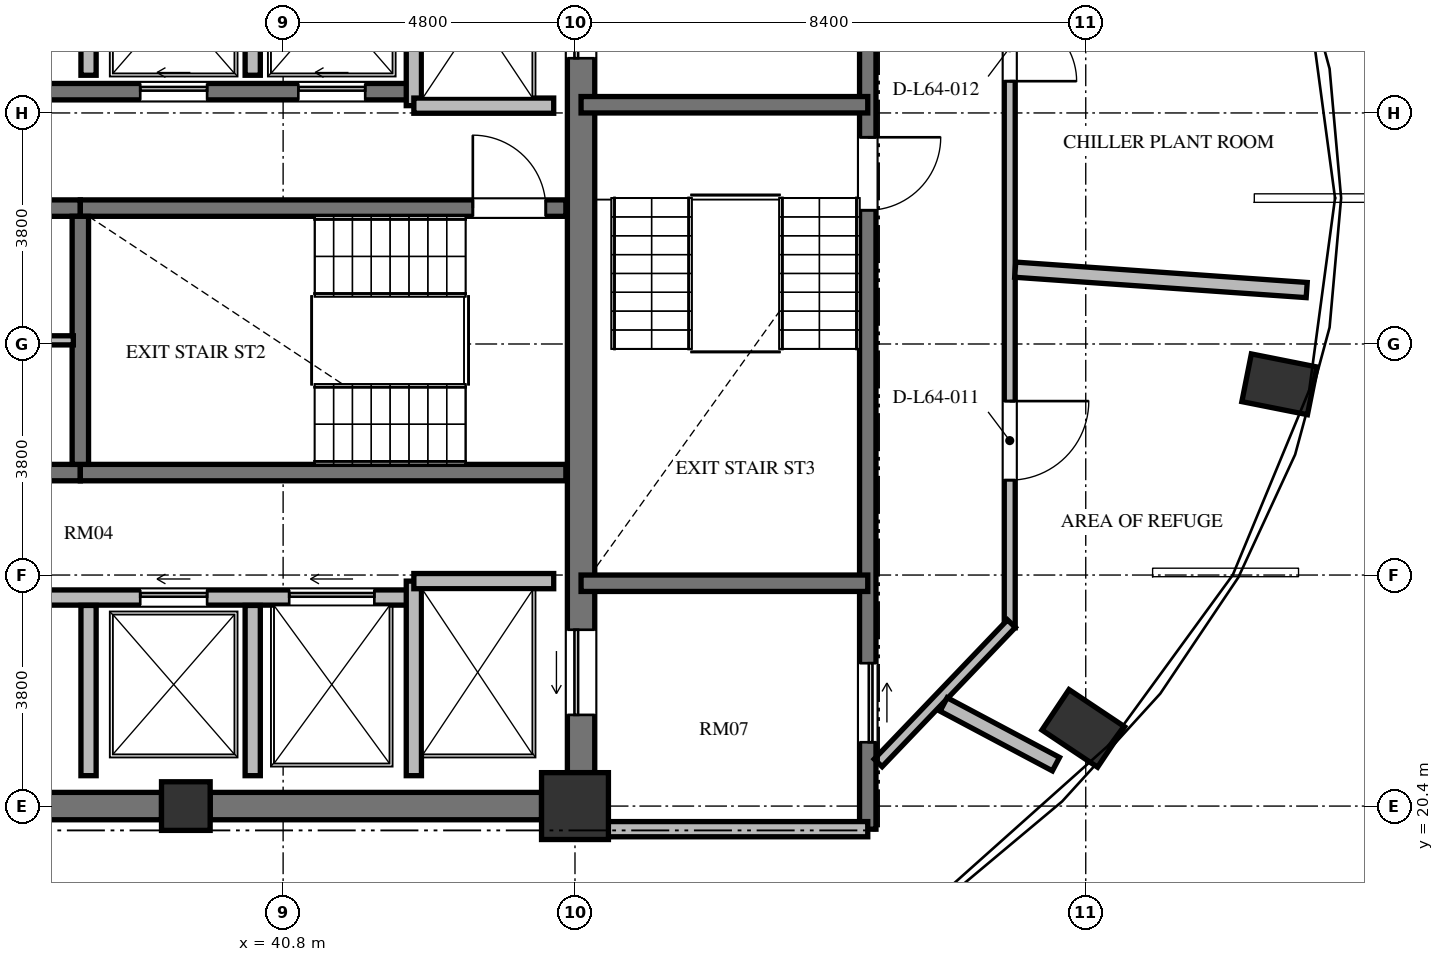
"""IFC4 building model, lengths in metres.
Left out: names, types, materials, properties, quantities, classifications, styles, units other than length and angle.
Written with IfcOpenShell. Run it as: python <this file> out.ifc"""

import sys

from ifc_helpers import new_model, si_unit, direction, frame, frame_2d, origin, origin_2d, place, context, subcontext, project, spatial, rectangle, extrude, element, fill, save


model = new_model("IFC4")
c1 = context("Model", 3, precision=1e-05, world=origin(), true_north=direction((0.0, 1.0)))
c2 = subcontext(c1, "Body", "Model", "MODEL_VIEW")
j1 = project(units=[si_unit("LENGTHUNIT", "METRE"), si_unit("PLANEANGLEUNIT", "RADIAN")], contexts=[c1])
p1 = place(None, origin())
s1 = spatial("IfcSite", under=j1, at=p1, CompositionType="ELEMENT")
p2 = place(p1, origin())
s2 = spatial("IfcBuilding", under=s1, at=p2, CompositionType="ELEMENT")
p3 = place(p2, frame((0.0, 0.0, 245.904)))
s3 = spatial("IfcBuildingStorey", under=s2, at=p3, CompositionType="ELEMENT", Elevation=245.904)
for number, where, z_axis, x_axis in (
    (1, (53.96, 21.677, 0.0), (0.0, 0.0, 1.0), (0.831, -0.556, 0.0)),
    (2, (57.185, 27.337, 0.0), (0.0, 0.0, 1.0), (0.981, -0.195, 0.0)),
):
    element("IfcColumn", number, at=place(p3, frame(where, z_axis=z_axis, x_axis=x_axis)), inside=s3, PredefinedType="COLUMN", context=c2, shape_type="SweptSolid", body=[
        extrude(rectangle(XDim=1.1, YDim=0.8, at=origin_2d()), origin(), (0.0, 0.0, 1.0), 5.472),
    ])
p4 = place(p3, frame((39.2, 20.4, 0.0), z_axis=(0.0, 0.0, 1.0), x_axis=(1.0, 0.0, 0.0)))
e3 = element("IfcColumn", 3, at=p4, inside=s3, PredefinedType="COLUMN", context=c2, shape_type="SweptSolid", body=[
    extrude(rectangle(XDim=0.8, YDim=0.8, at=origin_2d()), origin(), (0.0, 0.0, 1.0), 5.472),
])
p5 = place(p3, frame((45.6, 20.4, 0.0), z_axis=(0.0, 0.0, 1.0), x_axis=(1.0, 0.0, 0.0)))
e4 = element("IfcColumn", 4, at=p5, inside=s3, PredefinedType="COLUMN", context=c2, shape_type="SweptSolid", body=[
    extrude(rectangle(XDim=1.1, YDim=1.1, at=origin_2d()), origin(), (0.0, 0.0, 1.0), 5.472),
])
p6 = place(p3, frame((45.7, 20.95, 0.0), z_axis=(0.0, 0.0, 1.0), x_axis=(0.0, 1.0, 0.0)))
e5 = element("IfcWall", 5, at=p6, inside=s3, PredefinedType="SHEAR", context=c2, shape_type="SweptSolid", body=[
    extrude(rectangle(XDim=14.1, YDim=0.45, at=frame_2d((7.05, 0.0))), origin(), (0.0, 0.0, 1.0), 5.472),
])
p7 = place(p6, frame((11.75, 0.0, 0.0)))
e6 = element("IfcOpeningElement", 6, at=p7, cuts=e5, PredefinedType="OPENING", context=c2, shape_type="SweptSolid", body=[
    extrude(rectangle(XDim=1.4, YDim=2.3, at=frame_2d((0.7, 1.15))), frame((0.0, 0.235, 0.0), z_axis=(0.0, -1.0, 0.0), x_axis=(1.0, 0.0, 0.0)), (0.0, 0.0, 1.0), 0.47),
])
p8 = place(p6, frame((0.95, 0.0, 0.0)))
e7 = element("IfcOpeningElement", 7, at=p8, cuts=e5, PredefinedType="OPENING", context=c2, shape_type="SweptSolid", body=[
    extrude(rectangle(XDim=1.4, YDim=2.3, at=frame_2d((0.7, 1.15))), frame((0.0, 0.235, 0.0), z_axis=(0.0, -1.0, 0.0), x_axis=(1.0, 0.0, 0.0)), (0.0, 0.0, 1.0), 0.47),
])
p9 = place(p3, frame((33.2, 20.4, 0.0), z_axis=(0.0, 0.0, 1.0), x_axis=(1.0, 0.0, 0.0)))
e8 = element("IfcWall", 8, at=p9, inside=s3, PredefinedType="SHEAR", context=c2, shape_type="SweptSolid", body=[
    extrude(rectangle(XDim=5.6, YDim=0.45, at=frame_2d((2.8, 0.0))), origin(), (0.0, 0.0, 1.0), 5.472),
])
p10 = place(p3, frame((39.6, 20.4, 0.0), z_axis=(0.0, 0.0, 1.0), x_axis=(1.0, 0.0, 0.0)))
e9 = element("IfcWall", 9, at=p10, inside=s3, PredefinedType="SHEAR", context=c2, shape_type="SweptSolid", body=[
    extrude(rectangle(XDim=5.45, YDim=0.45, at=frame_2d((2.725, 0.0))), origin(), (0.0, 0.0, 1.0), 5.472),
])
p11 = place(p3, frame((34.535, 30.235, 0.0), z_axis=(0.0, 0.0, 1.0), x_axis=(1.0, 0.0, 0.0)))
e10 = element("IfcWall", 10, at=p11, inside=s3, PredefinedType="SHEAR", context=c2, shape_type="SweptSolid", body=[
    extrude(rectangle(XDim=2.93, YDim=0.27, at=frame_2d((1.465, 0.0))), origin(), (0.0, 0.0, 1.0), 5.472),
])
p12 = place(p11, frame((0.915, 0.0, 0.0)))
e11 = element("IfcOpeningElement", 11, at=p12, cuts=e10, PredefinedType="OPENING", context=c2, shape_type="SweptSolid", body=[
    extrude(rectangle(XDim=1.1, YDim=2.15, at=frame_2d((0.55, 1.075))), frame((0.0, 0.145, 0.0), z_axis=(0.0, -1.0, 0.0), x_axis=(1.0, 0.0, 0.0)), (0.0, 0.0, 1.0), 0.29),
])
p13 = place(p3, frame((37.465, 30.235, 0.0), z_axis=(0.0, 0.0, 1.0), x_axis=(1.0, 0.0, 0.0)))
e12 = element("IfcWall", 12, at=p13, inside=s3, PredefinedType="SHEAR", context=c2, shape_type="SweptSolid", body=[
    extrude(rectangle(XDim=7.985, YDim=0.27, at=frame_2d((3.992, 0.0))), origin(), (0.0, 0.0, 1.0), 5.472),
])
p14 = place(p13, frame((6.455, 0.0, 0.0)))
e13 = element("IfcOpeningElement", 13, at=p14, cuts=e12, PredefinedType="OPENING", context=c2, shape_type="SweptSolid", body=[
    extrude(rectangle(XDim=1.2, YDim=2.15, at=frame_2d((0.6, 1.075))), frame((0.0, 0.145, 0.0), z_axis=(0.0, -1.0, 0.0), x_axis=(1.0, 0.0, 0.0)), (0.0, 0.0, 1.0), 0.29),
])
p15 = place(p3, frame((34.535, 25.885, 0.0), z_axis=(0.0, 0.0, 1.0), x_axis=(1.0, 0.0, 0.0)))
e14 = element("IfcWall", 14, at=p15, inside=s3, PredefinedType="SHEAR", context=c2, shape_type="SweptSolid", body=[
    extrude(rectangle(XDim=2.93, YDim=0.27, at=frame_2d((1.465, 0.0))), origin(), (0.0, 0.0, 1.0), 5.472),
])
p16 = place(p15, frame((0.94, 0.0, 0.0)))
e15 = element("IfcOpeningElement", 15, at=p16, cuts=e14, PredefinedType="OPENING", context=c2, shape_type="SweptSolid", body=[
    extrude(rectangle(XDim=1.05, YDim=2.15, at=frame_2d((0.525, 1.075))), frame((0.0, 0.145, 0.0), z_axis=(0.0, -1.0, 0.0), x_axis=(1.0, 0.0, 0.0)), (0.0, 0.0, 1.0), 0.29),
])
p17 = place(p3, frame((37.465, 25.885, 0.0), z_axis=(0.0, 0.0, 1.0), x_axis=(1.0, 0.0, 0.0)))
e16 = element("IfcWall", 16, at=p17, inside=s3, PredefinedType="SHEAR", context=c2, shape_type="SweptSolid", body=[
    extrude(rectangle(XDim=7.985, YDim=0.27, at=frame_2d((3.992, 0.0))), origin(), (0.0, 0.0, 1.0), 5.472),
])
p18 = place(p3, frame((37.465, 26.02, 0.0), z_axis=(0.0, 0.0, 1.0), x_axis=(0.0, 1.0, 0.0)))
e17 = element("IfcWall", 17, at=p18, inside=s3, PredefinedType="SHEAR", context=c2, shape_type="SweptSolid", body=[
    extrude(rectangle(XDim=4.08, YDim=0.27, at=frame_2d((2.04, 0.0))), origin(), (0.0, 0.0, 1.0), 5.472),
])
p19 = place(p3, frame((34.65, 28.06, 0.0), z_axis=(0.0, 0.0, 1.0), x_axis=(1.0, 0.0, 0.0)))
e18 = element("IfcWall", 18, at=p19, inside=s3, PredefinedType="PARTITIONING", context=c2, shape_type="SweptSolid", body=[
    extrude(rectangle(XDim=2.7, YDim=0.15, at=frame_2d((1.35, 0.0))), origin(), (0.0, 0.0, 1.0), 5.272),
])
p20 = place(p3, frame((26.55, 32.15, 0.0), z_axis=(0.0, 0.0, 1.0), x_axis=(1.0, 0.0, 0.0)))
e19 = element("IfcWall", 19, at=p20, inside=s3, PredefinedType="SHEAR", context=c2, shape_type="SweptSolid", body=[
    extrude(rectangle(XDim=16.4, YDim=0.27, at=frame_2d((8.2, 0.0))), origin(), (0.0, 0.0, 1.0), 5.472),
])
p21 = place(p20, frame((2.175, 0.0, 0.0)))
e20 = element("IfcOpeningElement", 20, at=p21, cuts=e19, PredefinedType="OPENING", context=c2, shape_type="SweptSolid", body=[
    extrude(rectangle(XDim=1.05, YDim=2.15, at=frame_2d((0.525, 1.075))), frame((0.0, 0.145, 0.0), z_axis=(0.0, -1.0, 0.0), x_axis=(1.0, 0.0, 0.0)), (0.0, 0.0, 1.0), 0.29),
])
p22 = place(p20, frame((7.575, 0.0, 0.0)))
e21 = element("IfcOpeningElement", 21, at=p22, cuts=e19, PredefinedType="OPENING", context=c2, shape_type="SweptSolid", body=[
    extrude(rectangle(XDim=1.05, YDim=2.15, at=frame_2d((0.525, 1.075))), frame((0.0, 0.145, 0.0), z_axis=(0.0, -1.0, 0.0), x_axis=(1.0, 0.0, 0.0)), (0.0, 0.0, 1.0), 0.29),
])
p23 = place(p20, frame((11.9, 0.0, 0.0)))
e22 = element("IfcOpeningElement", 22, at=p23, cuts=e19, PredefinedType="OPENING", context=c2, shape_type="SweptSolid", body=[
    extrude(rectangle(XDim=1.1, YDim=2.2, at=frame_2d((0.55, 1.1))), frame((0.0, 0.145, 0.0), z_axis=(0.0, -1.0, 0.0), x_axis=(1.0, 0.0, 0.0)), (0.0, 0.0, 1.0), 0.29),
])
p24 = place(p20, frame((14.5, 0.0, 0.0)))
e23 = element("IfcOpeningElement", 23, at=p24, cuts=e19, PredefinedType="OPENING", context=c2, shape_type="SweptSolid", body=[
    extrude(rectangle(XDim=1.1, YDim=2.2, at=frame_2d((0.55, 1.1))), frame((0.0, 0.145, 0.0), z_axis=(0.0, -1.0, 0.0), x_axis=(1.0, 0.0, 0.0)), (0.0, 0.0, 1.0), 0.29),
])
p25 = place(p3, frame((26.75, 23.83, 0.0), z_axis=(0.0, 0.0, 1.0), x_axis=(1.0, 0.0, 0.0)))
e24 = element("IfcWall", 24, at=p25, inside=s3, PredefinedType="SOLIDWALL", context=c2, shape_type="SweptSolid", body=[
    extrude(rectangle(XDim=16.2, YDim=0.25, at=frame_2d((8.1, 0.0))), origin(), (0.0, 0.0, 1.0), 5.272),
])
p26 = place(p25, frame((4.75, 0.0, 0.0)))
e25 = element("IfcOpeningElement", 25, at=p26, cuts=e24, PredefinedType="OPENING", context=c2, shape_type="SweptSolid", body=[
    extrude(rectangle(XDim=1.4, YDim=2.2, at=frame_2d((0.7, 1.1))), frame((0.0, 0.135, 0.0), z_axis=(0.0, -1.0, 0.0), x_axis=(1.0, 0.0, 0.0)), (0.0, 0.0, 1.0), 0.27),
])
p27 = place(p25, frame((11.7, 0.0, 0.0)))
e26 = element("IfcOpeningElement", 26, at=p27, cuts=e24, PredefinedType="OPENING", context=c2, shape_type="SweptSolid", body=[
    extrude(rectangle(XDim=1.1, YDim=2.2, at=frame_2d((0.55, 1.1))), frame((0.0, 0.135, 0.0), z_axis=(0.0, -1.0, 0.0), x_axis=(1.0, 0.0, 0.0)), (0.0, 0.0, 1.0), 0.27),
])
p28 = place(p25, frame((14.15, 0.0, 0.0)))
e27 = element("IfcOpeningElement", 27, at=p28, cuts=e24, PredefinedType="OPENING", context=c2, shape_type="SweptSolid", body=[
    extrude(rectangle(XDim=1.4, YDim=2.3, at=frame_2d((0.7, 1.15))), frame((0.0, 0.135, 0.0), z_axis=(0.0, -1.0, 0.0), x_axis=(1.0, 0.0, 0.0)), (0.0, 0.0, 1.0), 0.27),
])
p29 = place(p3, frame((42.95, 31.92, 0.0), z_axis=(0.0, 0.0, 1.0), x_axis=(0.0, 1.0, 0.0)))
e28 = element("IfcWall", 28, at=p29, inside=s3, PredefinedType="SOLIDWALL", context=c2, shape_type="SweptSolid", body=[
    extrude(rectangle(XDim=3.18, YDim=0.25, at=frame_2d((1.59, 0.0))), origin(), (0.0, 0.0, 1.0), 5.272),
])
p30 = place(p3, frame((42.95, 31.92, 0.0), z_axis=(0.0, 0.0, 1.0), x_axis=(1.0, 0.0, 0.0)))
e29 = element("IfcWall", 29, at=p30, inside=s3, PredefinedType="SOLIDWALL", context=c2, shape_type="SweptSolid", body=[
    extrude(rectangle(XDim=2.3, YDim=0.25, at=frame_2d((1.15, 0.0))), origin(), (0.0, 0.0, 1.0), 5.272),
])
p31 = place(p3, frame((42.95, 20.9, 0.0), z_axis=(0.0, 0.0, 1.0), x_axis=(0.0, 1.0, 0.0)))
e30 = element("IfcWall", 30, at=p31, inside=s3, PredefinedType="SOLIDWALL", context=c2, shape_type="SweptSolid", body=[
    extrude(rectangle(XDim=3.2, YDim=0.25, at=frame_2d((1.6, 0.0))), origin(), (0.0, 0.0, 1.0), 5.272),
])
p32 = place(p3, frame((42.95, 24.1, 0.0), z_axis=(0.0, 0.0, 1.0), x_axis=(1.0, 0.0, 0.0)))
e31 = element("IfcWall", 31, at=p32, inside=s3, PredefinedType="SOLIDWALL", context=c2, shape_type="SweptSolid", body=[
    extrude(rectangle(XDim=2.3, YDim=0.25, at=frame_2d((1.15, 0.0))), origin(), (0.0, 0.0, 1.0), 5.272),
])
p33 = place(p3, frame((37.6, 32.42, 0.0), z_axis=(0.0, 0.0, 1.0), x_axis=(0.0, 1.0, 0.0)))
e32 = element("IfcWall", 32, at=p33, inside=s3, PredefinedType="SOLIDWALL", context=c2, shape_type="SweptSolid", body=[
    extrude(rectangle(XDim=2.68, YDim=0.25, at=frame_2d((1.34, 0.0))), origin(), (0.0, 0.0, 1.0), 5.272),
])
p34 = place(p3, frame((37.6, 20.9, 0.0), z_axis=(0.0, 0.0, 1.0), x_axis=(0.0, 1.0, 0.0)))
e33 = element("IfcWall", 33, at=p34, inside=s3, PredefinedType="SOLIDWALL", context=c2, shape_type="SweptSolid", body=[
    extrude(rectangle(XDim=2.8, YDim=0.25, at=frame_2d((1.4, 0.0))), origin(), (0.0, 0.0, 1.0), 5.272),
])
p35 = place(p3, frame((40.3, 32.42, 0.0), z_axis=(0.0, 0.0, 1.0), x_axis=(0.0, 1.0, 0.0)))
e34 = element("IfcWall", 34, at=p35, inside=s3, PredefinedType="SOLIDWALL", context=c2, shape_type="SweptSolid", body=[
    extrude(rectangle(XDim=2.68, YDim=0.25, at=frame_2d((1.34, 0.0))), origin(), (0.0, 0.0, 1.0), 5.272),
])
p36 = place(p3, frame((40.3, 20.9, 0.0), z_axis=(0.0, 0.0, 1.0), x_axis=(0.0, 1.0, 0.0)))
e35 = element("IfcWall", 35, at=p36, inside=s3, PredefinedType="SOLIDWALL", context=c2, shape_type="SweptSolid", body=[
    extrude(rectangle(XDim=2.8, YDim=0.25, at=frame_2d((1.4, 0.0))), origin(), (0.0, 0.0, 1.0), 5.272),
])
p37 = place(p3, frame((50.415, 35.845, 0.0), z_axis=(0.0, 0.0, 1.0), x_axis=(0.0, -1.0, 0.0)))
e36 = element("IfcWall", 36, at=p37, inside=s3, PredefinedType="SHEAR", context=c2, shape_type="SweptSolid", body=[
    extrude(rectangle(XDim=15.825, YDim=0.27, at=frame_2d((7.913, 0.0))), origin(), (0.0, 0.0, 1.0), 5.472),
])
p38 = place(p37, frame((4.445, 0.0, 0.0)))
e37 = element("IfcOpeningElement", 37, at=p38, cuts=e36, PredefinedType="OPENING", context=c2, shape_type="SweptSolid", body=[
    extrude(rectangle(XDim=1.2, YDim=2.15, at=frame_2d((0.6, 1.075))), frame((0.0, 0.145, 0.0), z_axis=(0.0, -1.0, 0.0), x_axis=(1.0, 0.0, 0.0)), (0.0, 0.0, 1.0), 0.29),
])
p39 = place(p37, frame((1.295, 0.0, 0.0)))
e38 = element("IfcOpeningElement", 38, at=p39, cuts=e36, PredefinedType="OPENING", context=c2, shape_type="SweptSolid", body=[
    extrude(rectangle(XDim=1.3, YDim=2.2, at=frame_2d((0.65, 1.1))), frame((0.0, 0.145, 0.0), z_axis=(0.0, -1.0, 0.0), x_axis=(1.0, 0.0, 0.0)), (0.0, 0.0, 1.0), 0.29),
])
p40 = place(p37, frame((13.095, 0.0, 0.0)))
e39 = element("IfcOpeningElement", 39, at=p40, cuts=e36, PredefinedType="OPENING", context=c2, shape_type="SweptSolid", body=[
    extrude(rectangle(XDim=1.3, YDim=2.2, at=frame_2d((0.65, 1.1))), frame((0.0, 0.145, 0.0), z_axis=(0.0, -1.0, 0.0), x_axis=(1.0, 0.0, 0.0)), (0.0, 0.0, 1.0), 0.29),
])
for number, where, z_axis, x_axis in (
    (40, (45.7, 31.935, 0.0), (0.0, 0.0, 1.0), (1.0, 0.0, 0.0)),
    (41, (45.7, 24.065, 0.0), (0.0, 0.0, 1.0), (1.0, 0.0, 0.0)),
):
    element("IfcWall", number, at=place(p3, frame(where, z_axis=z_axis, x_axis=x_axis)), inside=s3, PredefinedType="SHEAR", context=c2, shape_type="SweptSolid", body=[
        extrude(rectangle(XDim=4.715, YDim=0.27, at=frame_2d((2.357, 0.0))), origin(), (0.0, 0.0, 1.0), 5.472),
    ])
p41 = place(p3, frame((45.7, 20.02, 0.0), z_axis=(0.0, 0.0, 1.0), x_axis=(1.0, 0.0, 0.0)))
e42 = element("IfcWall", 42, at=p41, inside=s3, PredefinedType="SOLIDWALL", context=c2, shape_type="SweptSolid", body=[
    extrude(rectangle(XDim=4.715, YDim=0.25, at=frame_2d((2.357, 0.0))), origin(), (0.0, 0.0, 1.0), 5.272),
])
p42 = place(p3, frame((52.75, 37.468, 0.0), z_axis=(0.0, 0.0, 1.0), x_axis=(0.0, -1.0, 0.0)))
e43 = element("IfcWall", 43, at=p42, inside=s3, PredefinedType="PARTITIONING", context=c2, shape_type="SweptSolid", body=[
    extrude(rectangle(XDim=14.136, YDim=0.18, at=frame_2d((7.068, 0.0))), origin(), (0.0, 0.0, 1.0), 5.272),
])
p43 = place(p42, frame((10.407, 0.0, 0.0)))
e44 = element("IfcOpeningElement", 44, at=p43, cuts=e43, PredefinedType="OPENING", context=c2, shape_type="SweptSolid", body=[
    extrude(rectangle(XDim=1.3, YDim=2.2, at=frame_2d((0.65, 1.1))), frame((0.0, 0.1, 0.0), z_axis=(0.0, -1.0, 0.0), x_axis=(1.0, 0.0, 0.0)), (0.0, 0.0, 1.0), 0.2),
])
p44 = place(p42, frame((4.046, 0.0, 0.0)))
e45 = element("IfcOpeningElement", 45, at=p44, cuts=e43, PredefinedType="OPENING", context=c2, shape_type="SweptSolid", body=[
    extrude(rectangle(XDim=1.1, YDim=2.15, at=frame_2d((0.55, 1.075))), frame((0.0, 0.1, 0.0), z_axis=(0.0, -1.0, 0.0), x_axis=(1.0, 0.0, 0.0)), (0.0, 0.0, 1.0), 0.2),
])
p45 = place(p3, frame((52.778, 23.401, 0.0), z_axis=(0.0, 0.0, 1.0), x_axis=(-0.691338054195, -0.72253144902, 0.0)))
e46 = element("IfcWall", 46, at=p45, inside=s3, PredefinedType="PARTITIONING", context=c2, shape_type="SweptSolid", body=[
    extrude(rectangle(XDim=3.17, YDim=0.18, at=frame_2d((1.585, 0.0))), origin(), (0.0, 0.0, 1.0), 5.272),
])
p46 = place(p3, frame((51.662, 22.072, 0.0), z_axis=(0.0, 0.0, 1.0), x_axis=(0.882994838887, -0.469382695143, 0.0)))
e47 = element("IfcWall", 47, at=p46, inside=s3, PredefinedType="SOLIDWALL", context=c2, shape_type="SweptSolid", body=[
    extrude(rectangle(XDim=2.093, YDim=0.25, at=frame_2d((1.046, 0.0))), origin(), (0.0, 0.0, 1.0), 5.272),
])
p47 = place(p3, frame((52.84, 29.222, 0.0), z_axis=(0.0, 0.0, 1.0), x_axis=(0.997564343245, -0.069752283728, 0.0)))
e48 = element("IfcWall", 48, at=p47, inside=s3, PredefinedType="SOLIDWALL", context=c2, shape_type="SweptSolid", body=[
    extrude(rectangle(XDim=4.806, YDim=0.25, at=frame_2d((2.403, 0.0))), origin(), (0.0, 0.0, 1.0), 5.272),
])
p48 = place(p14, origin())
e49 = element("IfcDoor", 49, at=p48, inside=s3, OperationType="SINGLE_SWING_LEFT", PredefinedType="DOOR", context=c2, shape_type="SweptSolid", body=[
    extrude(rectangle(XDim=1.2, YDim=2.15, at=frame_2d((0.6, 1.075))), frame((0.0, 0.025, 0.0), z_axis=(0.0, -1.0, 0.0), x_axis=(1.0, 0.0, 0.0)), (0.0, 0.0, 1.0), 0.05),
])
fill(e13, e49)
p49 = place(p23, origin())
e50 = element("IfcDoor", 50, at=p49, inside=s3, OperationType="SLIDING_TO_LEFT", PredefinedType="DOOR", context=c2, shape_type="SweptSolid", body=[
    extrude(rectangle(XDim=1.1, YDim=2.2, at=frame_2d((0.55, 1.1))), frame((0.0, 0.025, 0.0), z_axis=(0.0, -1.0, 0.0), x_axis=(1.0, 0.0, 0.0)), (0.0, 0.0, 1.0), 0.05),
])
fill(e22, e50)
p50 = place(p24, origin())
e51 = element("IfcDoor", 51, at=p50, inside=s3, OperationType="SLIDING_TO_LEFT", PredefinedType="DOOR", context=c2, shape_type="SweptSolid", body=[
    extrude(rectangle(XDim=1.1, YDim=2.2, at=frame_2d((0.55, 1.1))), frame((0.0, 0.025, 0.0), z_axis=(0.0, -1.0, 0.0), x_axis=(1.0, 0.0, 0.0)), (0.0, 0.0, 1.0), 0.05),
])
fill(e23, e51)
p51 = place(p27, origin())
e52 = element("IfcDoor", 52, at=p51, inside=s3, OperationType="SLIDING_TO_LEFT", PredefinedType="DOOR", context=c2, shape_type="SweptSolid", body=[
    extrude(rectangle(XDim=1.1, YDim=2.2, at=frame_2d((0.55, 1.1))), frame((0.0, 0.025, 0.0), z_axis=(0.0, -1.0, 0.0), x_axis=(1.0, 0.0, 0.0)), (0.0, 0.0, 1.0), 0.05),
])
fill(e26, e52)
p52 = place(p7, origin())
e53 = element("IfcDoor", 53, at=p52, inside=s3, OperationType="SLIDING_TO_LEFT", PredefinedType="DOOR", context=c2, shape_type="SweptSolid", body=[
    extrude(rectangle(XDim=1.4, YDim=2.3, at=frame_2d((0.7, 1.15))), frame((0.0, 0.025, 0.0), z_axis=(0.0, -1.0, 0.0), x_axis=(1.0, 0.0, 0.0)), (0.0, 0.0, 1.0), 0.05),
])
fill(e6, e53)
p53 = place(p8, origin())
e54 = element("IfcDoor", 54, at=p53, inside=s3, OperationType="SLIDING_TO_LEFT", PredefinedType="DOOR", context=c2, shape_type="SweptSolid", body=[
    extrude(rectangle(XDim=1.4, YDim=2.3, at=frame_2d((0.7, 1.15))), frame((0.0, 0.025, 0.0), z_axis=(0.0, -1.0, 0.0), x_axis=(1.0, 0.0, 0.0)), (0.0, 0.0, 1.0), 0.05),
])
fill(e7, e54)
p54 = place(p28, origin())
e55 = element("IfcDoor", 55, at=p54, inside=s3, OperationType="SLIDING_TO_LEFT", PredefinedType="DOOR", context=c2, shape_type="SweptSolid", body=[
    extrude(rectangle(XDim=1.4, YDim=2.3, at=frame_2d((0.7, 1.15))), frame((0.0, 0.025, 0.0), z_axis=(0.0, -1.0, 0.0), x_axis=(1.0, 0.0, 0.0)), (0.0, 0.0, 1.0), 0.05),
])
fill(e27, e55)
p55 = place(p38, origin())
e56 = element("IfcDoor", 56, at=p55, inside=s3, OperationType="SINGLE_SWING_LEFT", PredefinedType="DOOR", context=c2, shape_type="SweptSolid", body=[
    extrude(rectangle(XDim=1.2, YDim=2.15, at=frame_2d((0.6, 1.075))), frame((0.0, 0.025, 0.0), z_axis=(0.0, -1.0, 0.0), x_axis=(1.0, 0.0, 0.0)), (0.0, 0.0, 1.0), 0.05),
])
fill(e37, e56)
p56 = place(p40, origin())
e57 = element("IfcDoor", 57, at=p56, inside=s3, OperationType="SLIDING_TO_LEFT", PredefinedType="DOOR", context=c2, shape_type="SweptSolid", body=[
    extrude(rectangle(XDim=1.3, YDim=2.2, at=frame_2d((0.65, 1.1))), frame((0.0, 0.025, 0.0), z_axis=(0.0, -1.0, 0.0), x_axis=(1.0, 0.0, 0.0)), (0.0, 0.0, 1.0), 0.05),
])
fill(e39, e57)
p57 = place(p43, origin())
e58 = element("IfcDoor", 58, at=p57, inside=s3, OperationType="SINGLE_SWING_LEFT", PredefinedType="DOOR", context=c2, shape_type="SweptSolid", body=[
    extrude(rectangle(XDim=1.3, YDim=2.2, at=frame_2d((0.65, 1.1))), frame((0.0, 0.025, 0.0), z_axis=(0.0, -1.0, 0.0), x_axis=(1.0, 0.0, 0.0)), (0.0, 0.0, 1.0), 0.05),
])
fill(e44, e58)
p58 = place(p44, origin())
e59 = element("IfcDoor", 59, at=p58, inside=s3, OperationType="SINGLE_SWING_RIGHT", PredefinedType="DOOR", context=c2, shape_type="SweptSolid", body=[
    extrude(rectangle(XDim=1.1, YDim=2.15, at=frame_2d((0.55, 1.075))), frame((0.0, 0.025, 0.0), z_axis=(0.0, -1.0, 0.0), x_axis=(1.0, 0.0, 0.0)), (0.0, 0.0, 1.0), 0.05),
])
fill(e45, e59)
save(model, sys.argv[1])
